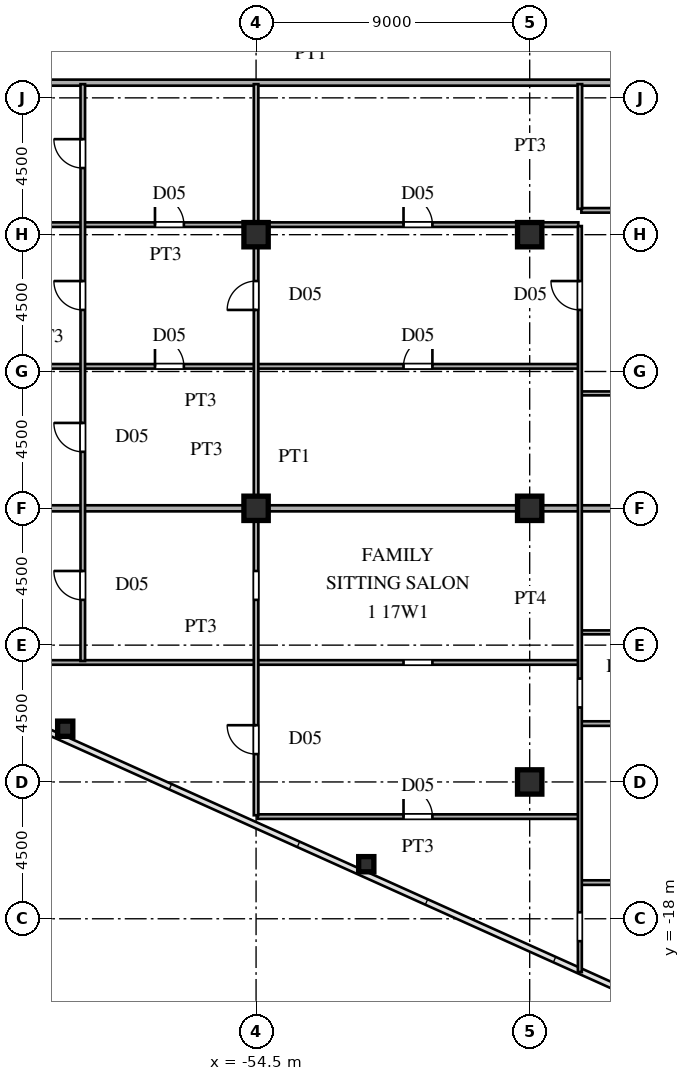
"""IFC4 building model, lengths in metres.
Left out: names, types, materials, properties, quantities, classifications, styles, units other than length and angle.
Written with IfcOpenShell. Run it as: python <this file> out.ifc"""

import sys

from ifc_helpers import new_model, si_unit, direction, frame, frame_2d, origin, origin_2d, place, context, subcontext, project, spatial, rectangle, hollow_rectangle, i_section, extrude, source, transform, mapped, element, fill, save


model = new_model("IFC4")
c1 = context("Model", 3, precision=1e-05, world=origin(), true_north=direction((0.0, 1.0)))
c2 = subcontext(c1, "Body", "Model", "MODEL_VIEW")
j1 = project(units=[si_unit("LENGTHUNIT", "METRE"), si_unit("PLANEANGLEUNIT", "RADIAN")], contexts=[c1])
p1 = place(None, origin())
s1 = spatial("IfcSite", under=j1, at=p1, CompositionType="ELEMENT")
p2 = place(p1, origin())
s2 = spatial("IfcBuilding", under=s1, at=p2, CompositionType="ELEMENT")
p3 = place(p2, frame((0.0, 0.0, 65.7)))
s3 = spatial("IfcBuildingStorey", under=s2, at=p3, CompositionType="ELEMENT", Elevation=65.7)
m1 = source(origin(), c2, "Body", "SweptSolid", [
    extrude(i_section(OverallWidth=0.8, OverallDepth=0.8, WebThickness=0.032, FlangeThickness=0.05, at=origin_2d()), origin(), (0.0, 0.0, 1.0), 3.6),
])
for number, where, z_axis, x_axis in (
    (1, (-45.5, -13.5, 0.0), (0.0, 0.0, 1.0), (1.0, 0.0, 0.0)),
    (2, (-45.5, -4.5, 0.0), (0.0, 0.0, 1.0), (1.0, 0.0, 0.0)),
    (3, (-45.5, 4.5, 0.0), (0.0, 0.0, 1.0), (1.0, 0.0, 0.0)),
    (4, (-54.5, -4.5, 0.0), (0.0, 0.0, 1.0), (1.0, 0.0, 0.0)),
    (5, (-54.5, 4.5, 0.0), (0.0, 0.0, 1.0), (1.0, 0.0, 0.0)),
):
    element("IfcColumn", number, at=place(p3, frame(where, z_axis=z_axis, x_axis=x_axis)), inside=s3, PredefinedType="COLUMN", context=c2, shape_type="MappedRepresentation", body=[
        mapped(m1, transform((0.0, 0.0, 0.0), scale=1.0)),
    ])
m2 = source(origin(), c2, "Body", "SweptSolid", [
    extrude(hollow_rectangle(XDim=0.5, YDim=0.5, WallThickness=0.02, at=origin_2d()), origin(), (0.0, 0.0, 1.0), 3.6),
])
for number, where, z_axis, x_axis in (
    (6, (-50.875, -16.205, 0.0), (0.0, 0.0, 1.0), (1.0, 0.0, 0.0)),
    (7, (-60.778, -11.749, 0.0), (0.0, 0.0, 1.0), (1.0, 0.0, 0.0)),
):
    element("IfcColumn", number, at=place(p3, frame(where, z_axis=z_axis, x_axis=x_axis)), inside=s3, PredefinedType="COLUMN", context=c2, shape_type="MappedRepresentation", body=[
        mapped(m2, transform((0.0, 0.0, 0.0), scale=1.0)),
    ])
p4 = place(p3, frame((-43.8, -16.81, 0.0), z_axis=(0.0, 0.0, 1.0), x_axis=(1.0, 0.0, 0.0)))
e8 = element("IfcWall", 8, at=p4, inside=s3, PredefinedType="PARTITIONING", context=c2, shape_type="SweptSolid", body=[
    extrude(rectangle(XDim=5.05, YDim=0.15, at=frame_2d((2.525, 0.0))), origin(), (0.0, 0.0, 1.0), 3.38),
])
p5 = place(p3, frame((-54.45, -14.64, 0.0), z_axis=(0.0, 0.0, 1.0), x_axis=(1.0, 0.0, 0.0)))
e9 = element("IfcWall", 9, at=p5, inside=s3, PredefinedType="PARTITIONING", context=c2, shape_type="SweptSolid", body=[
    extrude(rectangle(XDim=10.55, YDim=0.15, at=frame_2d((5.275, 0.0))), origin(), (0.0, 0.0, 1.0), 3.38),
])
p6 = place(p5, frame((4.8, 0.0, 0.0)))
e10 = element("IfcOpeningElement", 10, at=p6, cuts=e9, PredefinedType="OPENING", context=c2, shape_type="SweptSolid", body=[
    extrude(rectangle(XDim=0.95, YDim=2.15, at=frame_2d((0.475, 1.075))), frame((0.0, 0.085, 0.0), z_axis=(0.0, -1.0, 0.0), x_axis=(1.0, 0.0, 0.0)), (0.0, 0.0, 1.0), 0.17),
])
p7 = place(p3, frame((-43.8, -11.58, 0.0), z_axis=(0.0, 0.0, 1.0), x_axis=(1.0, 0.0, 0.0)))
e11 = element("IfcWall", 11, at=p7, inside=s3, PredefinedType="PARTITIONING", context=c2, shape_type="SweptSolid", body=[
    extrude(rectangle(XDim=5.0, YDim=0.15, at=frame_2d((2.5, 0.0))), origin(), (0.0, 0.0, 1.0), 3.38),
])
p8 = place(p7, frame((2.025, 0.0, 0.0)))
e12 = element("IfcOpeningElement", 12, at=p8, cuts=e11, PredefinedType="OPENING", context=c2, shape_type="SweptSolid", body=[
    extrude(rectangle(XDim=0.95, YDim=2.15, at=frame_2d((0.475, 1.075))), frame((0.0, 0.085, 0.0), z_axis=(0.0, -1.0, 0.0), x_axis=(1.0, 0.0, 0.0)), (0.0, 0.0, 1.0), 0.17),
])
p9 = place(p3, frame((-66.429, -9.57, 0.0), z_axis=(0.0, 0.0, 1.0), x_axis=(1.0, 0.0, 0.0)))
e13 = element("IfcWall", 13, at=p9, inside=s3, PredefinedType="PARTITIONING", context=c2, shape_type="SweptSolid", body=[
    extrude(rectangle(XDim=22.529, YDim=0.15, at=frame_2d((11.265, 0.0))), origin(), (0.0, 0.0, 1.0), 3.38),
])
p10 = place(p9, frame((16.779, 0.0, 0.0)))
e14 = element("IfcOpeningElement", 14, at=p10, cuts=e13, PredefinedType="OPENING", context=c2, shape_type="SweptSolid", body=[
    extrude(rectangle(XDim=0.95, YDim=2.15, at=frame_2d((0.475, 1.075))), frame((0.0, 0.085, 0.0), z_axis=(0.0, -1.0, 0.0), x_axis=(1.0, 0.0, 0.0)), (0.0, 0.0, 1.0), 0.17),
])
p11 = place(p3, frame((-43.8, -8.58, 0.0), z_axis=(0.0, 0.0, 1.0), x_axis=(1.0, 0.0, 0.0)))
e15 = element("IfcWall", 15, at=p11, inside=s3, PredefinedType="PARTITIONING", context=c2, shape_type="SweptSolid", body=[
    extrude(rectangle(XDim=5.0, YDim=0.13, at=frame_2d((2.5, 0.0))), origin(), (0.0, 0.0, 1.0), 3.38),
])
p12 = place(p11, frame((2.06, 0.0, 0.0)))
e16 = element("IfcOpeningElement", 16, at=p12, cuts=e15, PredefinedType="OPENING", context=c2, shape_type="SweptSolid", body=[
    extrude(rectangle(XDim=0.88, YDim=2.1, at=frame_2d((0.44, 1.05))), frame((0.0, 0.075, 0.0), z_axis=(0.0, -1.0, 0.0), x_axis=(1.0, 0.0, 0.0)), (0.0, 0.0, 1.0), 0.15),
])
p13 = place(p3, frame((-71.005, -4.5, 0.0), z_axis=(0.0, 0.0, 1.0), x_axis=(1.0, 0.0, 0.0)))
e17 = element("IfcWall", 17, at=p13, inside=s3, PredefinedType="PARTITIONING", context=c2, shape_type="SweptSolid", body=[
    extrude(rectangle(XDim=16.485, YDim=0.2, at=frame_2d((8.242, 0.0))), origin(), (0.0, 0.0, 1.0), 3.38),
])
p14 = place(p3, frame((-54.52, -4.5, 0.0), z_axis=(0.0, 0.0, 1.0), x_axis=(1.0, 0.0, 0.0)))
e18 = element("IfcWall", 18, at=p14, inside=s3, PredefinedType="PARTITIONING", context=c2, shape_type="SweptSolid", body=[
    extrude(rectangle(XDim=15.69, YDim=0.2, at=frame_2d((7.845, 0.0))), origin(), (0.0, 0.0, 1.0), 2.68),
])
p15 = place(p3, frame((-43.8, -0.72, 0.0), z_axis=(0.0, 0.0, 1.0), x_axis=(1.0, 0.0, 0.0)))
e19 = element("IfcWall", 19, at=p15, inside=s3, PredefinedType="PARTITIONING", context=c2, shape_type="SweptSolid", body=[
    extrude(rectangle(XDim=5.0, YDim=0.13, at=frame_2d((2.5, 0.0))), origin(), (0.0, 0.0, 1.0), 3.38),
])
p16 = place(p15, frame((2.06, 0.0, 0.0)))
e20 = element("IfcOpeningElement", 20, at=p16, cuts=e19, PredefinedType="OPENING", context=c2, shape_type="SweptSolid", body=[
    extrude(rectangle(XDim=0.88, YDim=2.1, at=frame_2d((0.44, 1.05))), frame((0.0, 0.075, 0.0), z_axis=(0.0, -1.0, 0.0), x_axis=(1.0, 0.0, 0.0)), (0.0, 0.0, 1.0), 0.15),
])
p17 = place(p3, frame((-71.035, 0.17, 0.0), z_axis=(0.0, 0.0, 1.0), x_axis=(1.0, 0.0, 0.0)))
e21 = element("IfcWall", 21, at=p17, inside=s3, PredefinedType="PARTITIONING", context=c2, shape_type="SweptSolid", body=[
    extrude(rectangle(XDim=27.135, YDim=0.15, at=frame_2d((13.567, 0.0))), origin(), (0.0, 0.0, 1.0), 3.38),
])
p18 = place(p17, frame((21.385, 0.0, 0.0)))
e22 = element("IfcOpeningElement", 22, at=p18, cuts=e21, PredefinedType="OPENING", context=c2, shape_type="SweptSolid", body=[
    extrude(rectangle(XDim=0.95, YDim=2.15, at=frame_2d((0.475, 1.075))), frame((0.0, 0.085, 0.0), z_axis=(0.0, -1.0, 0.0), x_axis=(1.0, 0.0, 0.0)), (0.0, 0.0, 1.0), 0.17),
])
p19 = place(p17, frame((13.21, 0.0, 0.0)))
e23 = element("IfcOpeningElement", 23, at=p19, cuts=e21, PredefinedType="OPENING", context=c2, shape_type="SweptSolid", body=[
    extrude(rectangle(XDim=0.95, YDim=2.15, at=frame_2d((0.475, 1.075))), frame((0.0, 0.085, 0.0), z_axis=(0.0, -1.0, 0.0), x_axis=(1.0, 0.0, 0.0)), (0.0, 0.0, 1.0), 0.17),
])
p20 = place(p3, frame((-71.035, 4.83, 0.0), z_axis=(0.0, 0.0, 1.0), x_axis=(1.0, 0.0, 0.0)))
e24 = element("IfcWall", 24, at=p20, inside=s3, PredefinedType="PARTITIONING", context=c2, shape_type="SweptSolid", body=[
    extrude(rectangle(XDim=27.135, YDim=0.15, at=frame_2d((13.567, 0.0))), origin(), (0.0, 0.0, 1.0), 3.38),
])
p21 = place(p20, frame((21.385, 0.0, 0.0)))
e25 = element("IfcOpeningElement", 25, at=p21, cuts=e24, PredefinedType="OPENING", context=c2, shape_type="SweptSolid", body=[
    extrude(rectangle(XDim=0.95, YDim=2.15, at=frame_2d((0.475, 1.075))), frame((0.0, 0.085, 0.0), z_axis=(0.0, -1.0, 0.0), x_axis=(1.0, 0.0, 0.0)), (0.0, 0.0, 1.0), 0.17),
])
p22 = place(p20, frame((13.21, 0.0, 0.0)))
e26 = element("IfcOpeningElement", 26, at=p22, cuts=e24, PredefinedType="OPENING", context=c2, shape_type="SweptSolid", body=[
    extrude(rectangle(XDim=0.95, YDim=2.15, at=frame_2d((0.475, 1.075))), frame((0.0, 0.085, 0.0), z_axis=(0.0, -1.0, 0.0), x_axis=(1.0, 0.0, 0.0)), (0.0, 0.0, 1.0), 0.17),
])
p23 = place(p3, frame((-43.8, 5.3, 0.0), z_axis=(0.0, 0.0, 1.0), x_axis=(1.0, 0.0, 0.0)))
e27 = element("IfcWall", 27, at=p23, inside=s3, PredefinedType="PARTITIONING", context=c2, shape_type="SweptSolid", body=[
    extrude(rectangle(XDim=5.0, YDim=0.15, at=frame_2d((2.5, 0.0))), origin(), (0.0, 0.0, 1.0), 3.38),
])
p24 = place(p23, frame((2.025, 0.0, 0.0)))
e28 = element("IfcOpeningElement", 28, at=p24, cuts=e27, PredefinedType="OPENING", context=c2, shape_type="SweptSolid", body=[
    extrude(rectangle(XDim=0.95, YDim=2.15, at=frame_2d((0.475, 1.075))), frame((0.0, 0.085, 0.0), z_axis=(0.0, -1.0, 0.0), x_axis=(1.0, 0.0, 0.0)), (0.0, 0.0, 1.0), 0.17),
])
p25 = place(p3, frame((-66.568, 9.5, 0.0), z_axis=(0.0, 0.0, 1.0), x_axis=(1.0, 0.0, 0.0)))
e29 = element("IfcWall", 29, at=p25, inside=s3, PredefinedType="PARTITIONING", context=c2, shape_type="SweptSolid", body=[
    extrude(rectangle(XDim=27.738, YDim=0.2, at=frame_2d((13.869, 0.0))), origin(), (0.0, 0.0, 1.0), 3.38),
])
p26 = place(p3, frame((-60.2, -9.522, 0.0), z_axis=(0.0, 0.0, 1.0), x_axis=(0.0, 1.0, 0.0)))
e30 = element("IfcWall", 30, at=p26, inside=s3, PredefinedType="PARTITIONING", context=c2, shape_type="SweptSolid", body=[
    extrude(rectangle(XDim=18.972, YDim=0.15, at=frame_2d((9.486, 0.0))), origin(), (0.0, 0.0, 1.0), 3.38),
])
p27 = place(p26, frame((2.011, 0.0, 0.0)))
e31 = element("IfcOpeningElement", 31, at=p27, cuts=e30, PredefinedType="OPENING", context=c2, shape_type="SweptSolid", body=[
    extrude(rectangle(XDim=0.95, YDim=2.15, at=frame_2d((0.475, 1.075))), frame((0.0, 0.085, 0.0), z_axis=(0.0, -1.0, 0.0), x_axis=(1.0, 0.0, 0.0)), (0.0, 0.0, 1.0), 0.17),
])
p28 = place(p26, frame((6.88, 0.0, 0.0)))
e32 = element("IfcOpeningElement", 32, at=p28, cuts=e30, PredefinedType="OPENING", context=c2, shape_type="SweptSolid", body=[
    extrude(rectangle(XDim=0.95, YDim=2.15, at=frame_2d((0.475, 1.075))), frame((0.0, 0.085, 0.0), z_axis=(0.0, -1.0, 0.0), x_axis=(1.0, 0.0, 0.0)), (0.0, 0.0, 1.0), 0.17),
])
p29 = place(p26, frame((11.547, 0.0, 0.0)))
e33 = element("IfcOpeningElement", 33, at=p29, cuts=e30, PredefinedType="OPENING", context=c2, shape_type="SweptSolid", body=[
    extrude(rectangle(XDim=0.95, YDim=2.15, at=frame_2d((0.475, 1.075))), frame((0.0, 0.085, 0.0), z_axis=(0.0, -1.0, 0.0), x_axis=(1.0, 0.0, 0.0)), (0.0, 0.0, 1.0), 0.17),
])
p30 = place(p26, frame((16.214, 0.0, 0.0)))
e34 = element("IfcOpeningElement", 34, at=p30, cuts=e30, PredefinedType="OPENING", context=c2, shape_type="SweptSolid", body=[
    extrude(rectangle(XDim=0.95, YDim=2.15, at=frame_2d((0.475, 1.075))), frame((0.0, 0.085, 0.0), z_axis=(0.0, -1.0, 0.0), x_axis=(1.0, 0.0, 0.0)), (0.0, 0.0, 1.0), 0.17),
])
p31 = place(p3, frame((-54.5, -14.595, 0.0), z_axis=(0.0, 0.0, 1.0), x_axis=(0.0, 1.0, 0.0)))
e35 = element("IfcWall", 35, at=p31, inside=s3, PredefinedType="PARTITIONING", context=c2, shape_type="SweptSolid", body=[
    extrude(rectangle(XDim=24.045, YDim=0.15, at=frame_2d((12.022, 0.0))), origin(), (0.0, 0.0, 1.0), 2.68),
])
p32 = place(p31, frame((2.011, 0.0, 0.0)))
e36 = element("IfcOpeningElement", 36, at=p32, cuts=e35, PredefinedType="OPENING", context=c2, shape_type="SweptSolid", body=[
    extrude(rectangle(XDim=0.95, YDim=2.15, at=frame_2d((0.475, 1.075))), frame((0.0, 0.085, 0.0), z_axis=(0.0, -1.0, 0.0), x_axis=(1.0, 0.0, 0.0)), (0.0, 0.0, 1.0), 0.17),
])
p33 = place(p31, frame((7.084, 0.0, 0.0)))
e37 = element("IfcOpeningElement", 37, at=p33, cuts=e35, PredefinedType="OPENING", context=c2, shape_type="SweptSolid", body=[
    extrude(rectangle(XDim=0.95, YDim=2.15, at=frame_2d((0.475, 1.075))), frame((0.0, 0.085, 0.0), z_axis=(0.0, -1.0, 0.0), x_axis=(1.0, 0.0, 0.0)), (0.0, 0.0, 1.0), 0.17),
])
p34 = place(p31, frame((16.62, 0.0, 0.0)))
e38 = element("IfcOpeningElement", 38, at=p34, cuts=e35, PredefinedType="OPENING", context=c2, shape_type="SweptSolid", body=[
    extrude(rectangle(XDim=0.95, YDim=2.15, at=frame_2d((0.475, 1.075))), frame((0.0, 0.085, 0.0), z_axis=(0.0, -1.0, 0.0), x_axis=(1.0, 0.0, 0.0)), (0.0, 0.0, 1.0), 0.17),
])
p35 = place(p3, frame((-43.85, -19.753, 0.0), z_axis=(0.0, 0.0, 1.0), x_axis=(0.0, 1.0, 0.0)))
e39 = element("IfcWall", 39, at=p35, inside=s3, PredefinedType="PARTITIONING", context=c2, shape_type="SweptSolid", body=[
    extrude(rectangle(XDim=24.536, YDim=0.13, at=frame_2d((12.268, 0.0))), origin(), (0.0, 0.0, 1.0), 3.38),
])
p36 = place(p35, frame((8.703, 0.0, 0.0)))
e40 = element("IfcOpeningElement", 40, at=p36, cuts=e39, PredefinedType="OPENING", context=c2, shape_type="SweptSolid", body=[
    extrude(rectangle(XDim=0.95, YDim=2.15, at=frame_2d((0.475, 1.075))), frame((0.0, 0.075, 0.0), z_axis=(0.0, -1.0, 0.0), x_axis=(1.0, 0.0, 0.0)), (0.0, 0.0, 1.0), 0.15),
])
p37 = place(p35, frame((1.016, 0.0, 0.0)))
e41 = element("IfcOpeningElement", 41, at=p37, cuts=e39, PredefinedType="OPENING", context=c2, shape_type="SweptSolid", body=[
    extrude(rectangle(XDim=0.95, YDim=2.15, at=frame_2d((0.475, 1.075))), frame((0.0, 0.075, 0.0), z_axis=(0.0, -1.0, 0.0), x_axis=(1.0, 0.0, 0.0)), (0.0, 0.0, 1.0), 0.15),
])
p38 = place(p35, frame((21.778, 0.0, 0.0)))
e42 = element("IfcOpeningElement", 42, at=p38, cuts=e39, PredefinedType="OPENING", context=c2, shape_type="SweptSolid", body=[
    extrude(rectangle(XDim=0.95, YDim=2.15, at=frame_2d((0.475, 1.075))), frame((0.0, 0.075, 0.0), z_axis=(0.0, -1.0, 0.0), x_axis=(1.0, 0.0, 0.0)), (0.0, 0.0, 1.0), 0.15),
])
p39 = place(p3, frame((-43.85, 5.352, 0.0), z_axis=(0.0, 0.0, 1.0), x_axis=(0.0, 1.0, 0.0)))
e43 = element("IfcWall", 43, at=p39, inside=s3, PredefinedType="PARTITIONING", context=c2, shape_type="SweptSolid", body=[
    extrude(rectangle(XDim=4.098, YDim=0.15, at=frame_2d((2.049, 0.0))), origin(), (0.0, 0.0, 1.0), 3.38),
])
m3 = source(origin(), c2, "Body", "SweptSolid", [
    extrude(rectangle(XDim=0.95, YDim=2.15, at=frame_2d((0.475, 1.075))), frame((0.0, 0.025, 0.0), z_axis=(0.0, -1.0, 0.0), x_axis=(1.0, 0.0, 0.0)), (0.0, 0.0, 1.0), 0.05),
])
p40 = place(p6, origin())
e44 = element("IfcDoor", 44, at=p40, inside=s3, OperationType="SINGLE_SWING_LEFT", PredefinedType="DOOR", context=c2, shape_type="MappedRepresentation", body=[
    mapped(m3, transform((0.0, 0.0, 0.0), scale=1.0)),
])
fill(e10, e44)
p41 = place(p18, origin())
e45 = element("IfcDoor", 45, at=p41, inside=s3, OperationType="SINGLE_SWING_RIGHT", PredefinedType="DOOR", context=c2, shape_type="MappedRepresentation", body=[
    mapped(m3, transform((0.0, 0.0, 0.0), scale=1.0)),
])
fill(e22, e45)
p42 = place(p19, origin())
e46 = element("IfcDoor", 46, at=p42, inside=s3, OperationType="SINGLE_SWING_LEFT", PredefinedType="DOOR", context=c2, shape_type="MappedRepresentation", body=[
    mapped(m3, transform((0.0, 0.0, 0.0), scale=1.0)),
])
fill(e23, e46)
p43 = place(p21, origin())
e47 = element("IfcDoor", 47, at=p43, inside=s3, OperationType="SINGLE_SWING_LEFT", PredefinedType="DOOR", context=c2, shape_type="MappedRepresentation", body=[
    mapped(m3, transform((0.0, 0.0, 0.0), scale=1.0)),
])
fill(e25, e47)
p44 = place(p22, origin())
e48 = element("IfcDoor", 48, at=p44, inside=s3, OperationType="SINGLE_SWING_LEFT", PredefinedType="DOOR", context=c2, shape_type="MappedRepresentation", body=[
    mapped(m3, transform((0.0, 0.0, 0.0), scale=1.0)),
])
fill(e26, e48)
p45 = place(p27, origin())
e49 = element("IfcDoor", 49, at=p45, inside=s3, OperationType="SINGLE_SWING_RIGHT", PredefinedType="DOOR", context=c2, shape_type="MappedRepresentation", body=[
    mapped(m3, transform((0.0, 0.0, 0.0), scale=1.0)),
])
fill(e31, e49)
p46 = place(p28, origin())
e50 = element("IfcDoor", 50, at=p46, inside=s3, OperationType="SINGLE_SWING_RIGHT", PredefinedType="DOOR", context=c2, shape_type="MappedRepresentation", body=[
    mapped(m3, transform((0.0, 0.0, 0.0), scale=1.0)),
])
fill(e32, e50)
p47 = place(p29, origin())
e51 = element("IfcDoor", 51, at=p47, inside=s3, OperationType="SINGLE_SWING_RIGHT", PredefinedType="DOOR", context=c2, shape_type="MappedRepresentation", body=[
    mapped(m3, transform((0.0, 0.0, 0.0), scale=1.0)),
])
fill(e33, e51)
p48 = place(p30, origin())
e52 = element("IfcDoor", 52, at=p48, inside=s3, OperationType="SINGLE_SWING_RIGHT", PredefinedType="DOOR", context=c2, shape_type="MappedRepresentation", body=[
    mapped(m3, transform((0.0, 0.0, 0.0), scale=1.0)),
])
fill(e34, e52)
p49 = place(p32, origin())
e53 = element("IfcDoor", 53, at=p49, inside=s3, OperationType="SINGLE_SWING_RIGHT", PredefinedType="DOOR", context=c2, shape_type="MappedRepresentation", body=[
    mapped(m3, transform((0.0, 0.0, 0.0), scale=1.0)),
])
fill(e36, e53)
p50 = place(p34, origin())
e54 = element("IfcDoor", 54, at=p50, inside=s3, OperationType="SINGLE_SWING_LEFT", PredefinedType="DOOR", context=c2, shape_type="MappedRepresentation", body=[
    mapped(m3, transform((0.0, 0.0, 0.0), scale=1.0)),
])
fill(e38, e54)
p51 = place(p38, origin())
e55 = element("IfcDoor", 55, at=p51, inside=s3, OperationType="SINGLE_SWING_RIGHT", PredefinedType="DOOR", context=c2, shape_type="MappedRepresentation", body=[
    mapped(m3, transform((0.0, 0.0, 0.0), scale=1.0)),
])
fill(e42, e55)
save(model, sys.argv[1])
